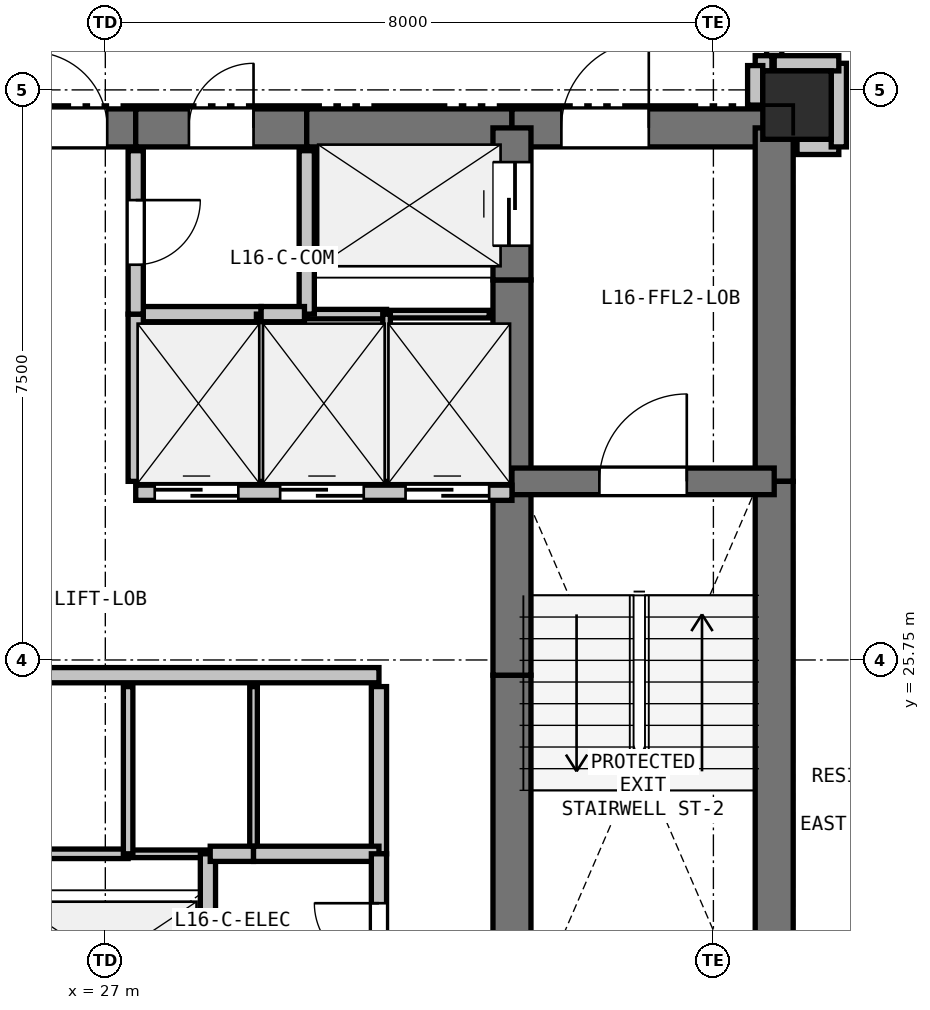
"""IFC4 building model, lengths in metres.
Left out: names, types, materials, properties, quantities, classifications, styles, units other than length and angle.
Written with IfcOpenShell. Run it as: python <this file> out.ifc"""

import sys

from ifc_helpers import new_model, si_unit, direction, frame, frame_2d, origin, origin_2d, place, context, subcontext, project, spatial, rectangle, extrude, element, fill, save


model = new_model("IFC4")
c1 = context("Model", 3, precision=1e-05, world=origin(), true_north=direction((0.0, 1.0)))
c2 = subcontext(c1, "Body", "Model", "MODEL_VIEW")
j1 = project(units=[si_unit("LENGTHUNIT", "METRE"), si_unit("PLANEANGLEUNIT", "RADIAN")], contexts=[c1])
p1 = place(None, origin())
s1 = spatial("IfcSite", under=j1, at=p1, CompositionType="ELEMENT")
p2 = place(p1, origin())
s2 = spatial("IfcBuilding", under=s1, at=p2, CompositionType="ELEMENT")
p3 = place(p2, frame((0.0, 0.0, 58.8)))
s3 = spatial("IfcBuildingStorey", under=s2, at=p3, CompositionType="ELEMENT", Elevation=58.8)
p4 = place(p3, frame((36.1, 33.05, 0.0), z_axis=(0.0, 0.0, 1.0), x_axis=(1.0, 0.0, 0.0)))
e1 = element("IfcColumn", 1, at=p4, inside=s3, PredefinedType="COLUMN", context=c2, shape_type="SweptSolid", body=[
    extrude(rectangle(XDim=0.9, YDim=0.9, at=origin_2d()), origin(), (0.0, 0.0, 1.0), 3.3),
])
p5 = place(p3, frame((25.65, 32.75, 0.0), z_axis=(0.0, 0.0, 1.0), x_axis=(1.0, 0.0, 0.0)))
e2 = element("IfcWall", 2, at=p5, inside=s3, PredefinedType="SHEAR", context=c2, shape_type="SweptSolid", body=[
    extrude(rectangle(XDim=1.75, YDim=0.5, at=frame_2d((0.875, 0.0))), origin(), (0.0, 0.0, 1.0), 3.02),
])
p6 = place(p5, frame((0.375, 0.0, 0.0)))
e3 = element("IfcOpeningElement", 3, at=p6, cuts=e2, PredefinedType="OPENING", context=c2, shape_type="SweptSolid", body=[
    extrude(rectangle(XDim=1.0, YDim=2.15, at=frame_2d((0.5, 1.075))), frame((0.0, 0.26, 0.0), z_axis=(0.0, -1.0, 0.0), x_axis=(1.0, 0.0, 0.0)), (0.0, 0.0, 1.0), 0.52),
])
p7 = place(p3, frame((27.4, 32.75, 0.0), z_axis=(0.0, 0.0, 1.0), x_axis=(1.0, 0.0, 0.0)))
e4 = element("IfcWall", 4, at=p7, inside=s3, PredefinedType="SHEAR", context=c2, shape_type="SweptSolid", body=[
    extrude(rectangle(XDim=2.25, YDim=0.5, at=frame_2d((1.125, 0.0))), origin(), (0.0, 0.0, 1.0), 3.02),
])
p8 = place(p7, frame((0.7, 0.0, 0.0)))
e5 = element("IfcOpeningElement", 5, at=p8, cuts=e4, PredefinedType="OPENING", context=c2, shape_type="SweptSolid", body=[
    extrude(rectangle(XDim=0.85, YDim=2.1, at=frame_2d((0.425, 1.05))), frame((0.0, 0.26, 0.0), z_axis=(0.0, -1.0, 0.0), x_axis=(1.0, 0.0, 0.0)), (0.0, 0.0, 1.0), 0.52),
])
p9 = place(p3, frame((29.65, 32.75, 0.0), z_axis=(0.0, 0.0, 1.0), x_axis=(1.0, 0.0, 0.0)))
e6 = element("IfcWall", 6, at=p9, inside=s3, PredefinedType="SHEAR", context=c2, shape_type="SweptSolid", body=[
    extrude(rectangle(XDim=2.7, YDim=0.5, at=frame_2d((1.35, 0.0))), origin(), (0.0, 0.0, 1.0), 3.02),
])
p10 = place(p3, frame((32.35, 32.75, 0.0), z_axis=(0.0, 0.0, 1.0), x_axis=(1.0, 0.0, 0.0)))
e7 = element("IfcWall", 7, at=p10, inside=s3, PredefinedType="SHEAR", context=c2, shape_type="SweptSolid", body=[
    extrude(rectangle(XDim=3.45, YDim=0.5, at=frame_2d((1.725, 0.0))), origin(), (0.0, 0.0, 1.0), 3.02),
])
p11 = place(p10, frame((0.65, 0.0, 0.0)))
e8 = element("IfcOpeningElement", 8, at=p11, cuts=e7, PredefinedType="OPENING", context=c2, shape_type="SweptSolid", body=[
    extrude(rectangle(XDim=1.15, YDim=2.15, at=frame_2d((0.575, 1.075))), frame((0.0, 0.26, 0.0), z_axis=(0.0, -1.0, 0.0), x_axis=(1.0, 0.0, 0.0)), (0.0, 0.0, 1.0), 0.52),
])
p12 = place(p3, frame((35.8, 32.75, 0.0), z_axis=(0.0, 0.0, 1.0), x_axis=(0.0, -1.0, 0.0)))
e9 = element("IfcWall", 9, at=p12, inside=s3, PredefinedType="SHEAR", context=c2, shape_type="SweptSolid", body=[
    extrude(rectangle(XDim=4.65, YDim=0.5, at=frame_2d((2.325, 0.0))), origin(), (0.0, 0.0, 1.0), 3.02),
])
p13 = place(p3, frame((35.8, 28.1, 0.0), z_axis=(0.0, 0.0, 1.0), x_axis=(0.0, -1.0, 0.0)))
e10 = element("IfcWall", 10, at=p13, inside=s3, PredefinedType="SHEAR", context=c2, shape_type="SweptSolid", body=[
    extrude(rectangle(XDim=7.35, YDim=0.5, at=frame_2d((3.675, 0.0))), origin(), (0.0, 0.0, 1.0), 3.02),
])
p14 = place(p3, frame((32.35, 20.75, 0.0), z_axis=(0.0, 0.0, 1.0), x_axis=(0.0, 1.0, 0.0)))
e11 = element("IfcWall", 11, at=p14, inside=s3, PredefinedType="SHEAR", context=c2, shape_type="SweptSolid", body=[
    extrude(rectangle(XDim=4.8, YDim=0.5, at=frame_2d((2.4, 0.0))), origin(), (0.0, 0.0, 1.0), 3.02),
])
p15 = place(p3, frame((32.35, 25.55, 0.0), z_axis=(0.0, 0.0, 1.0), x_axis=(0.0, 1.0, 0.0)))
e12 = element("IfcWall", 12, at=p15, inside=s3, PredefinedType="SHEAR", context=c2, shape_type="SweptSolid", body=[
    extrude(rectangle(XDim=2.4, YDim=0.5, at=frame_2d((1.2, 0.0))), origin(), (0.0, 0.0, 1.0), 3.02),
])
p16 = place(p3, frame((32.35, 27.95, 0.0), z_axis=(0.0, 0.0, 1.0), x_axis=(0.0, 1.0, 0.0)))
e13 = element("IfcWall", 13, at=p16, inside=s3, PredefinedType="SHEAR", context=c2, shape_type="SweptSolid", body=[
    extrude(rectangle(XDim=2.8, YDim=0.5, at=frame_2d((1.4, 0.0))), origin(), (0.0, 0.0, 1.0), 3.02),
])
p17 = place(p3, frame((32.35, 30.75, 0.0), z_axis=(0.0, 0.0, 1.0), x_axis=(0.0, 1.0, 0.0)))
e14 = element("IfcWall", 14, at=p17, inside=s3, PredefinedType="SHEAR", context=c2, shape_type="SweptSolid", body=[
    extrude(rectangle(XDim=2.0, YDim=0.5, at=frame_2d((1.0, 0.0))), origin(), (0.0, 0.0, 1.0), 3.02),
])
p18 = place(p17, frame((0.45, 0.0, 0.0)))
e15 = element("IfcOpeningElement", 15, at=p18, cuts=e14, PredefinedType="OPENING", context=c2, shape_type="SweptSolid", body=[
    extrude(rectangle(XDim=1.1, YDim=2.15, at=frame_2d((0.55, 1.075))), frame((0.0, 0.26, 0.0), z_axis=(0.0, -1.0, 0.0), x_axis=(1.0, 0.0, 0.0)), (0.0, 0.0, 1.0), 0.52),
])
p19 = place(p3, frame((32.35, 28.1, 0.0), z_axis=(0.0, 0.0, 1.0), x_axis=(1.0, 0.0, 0.0)))
e16 = element("IfcWall", 16, at=p19, inside=s3, PredefinedType="SHEAR", context=c2, shape_type="SweptSolid", body=[
    extrude(rectangle(XDim=3.45, YDim=0.35, at=frame_2d((1.725, 0.0))), origin(), (0.0, 0.0, 1.0), 3.02),
])
p20 = place(p19, frame((1.15, 0.0, 0.0)))
e17 = element("IfcOpeningElement", 17, at=p20, cuts=e16, PredefinedType="OPENING", context=c2, shape_type="SweptSolid", body=[
    extrude(rectangle(XDim=1.15, YDim=2.15, at=frame_2d((0.575, 1.075))), frame((0.0, 0.185, 0.0), z_axis=(0.0, -1.0, 0.0), x_axis=(1.0, 0.0, 0.0)), (0.0, 0.0, 1.0), 0.37),
])
p21 = place(p3, frame((25.65, 25.55, 0.0), z_axis=(0.0, 0.0, 1.0), x_axis=(1.0, 0.0, 0.0)))
e18 = element("IfcWall", 18, at=p21, inside=s3, PredefinedType="PARTITIONING", context=c2, shape_type="SweptSolid", body=[
    extrude(rectangle(XDim=4.95, YDim=0.2, at=frame_2d((2.475, 0.0))), origin(), (0.0, 0.0, 1.0), 3.02),
])
p22 = place(p3, frame((27.4, 27.95, 0.0), z_axis=(0.0, 0.0, 1.0), x_axis=(1.0, 0.0, 0.0)))
e19 = element("IfcWall", 19, at=p22, inside=s3, PredefinedType="PARTITIONING", context=c2, shape_type="SweptSolid", body=[
    extrude(rectangle(XDim=4.95, YDim=0.2, at=frame_2d((2.475, 0.0))), origin(), (0.0, 0.0, 1.0), 3.02),
])
p23 = place(p22, frame((0.25, 0.0, 0.0)))
e20 = element("IfcOpeningElement", 20, at=p23, cuts=e19, PredefinedType="OPENING", context=c2, shape_type="SweptSolid", body=[
    extrude(rectangle(XDim=1.1, YDim=2.15, at=frame_2d((0.55, 1.075))), frame((0.0, 0.11, 0.0), z_axis=(0.0, -1.0, 0.0), x_axis=(1.0, 0.0, 0.0)), (0.0, 0.0, 1.0), 0.22),
])
p24 = place(p22, frame((1.9, 0.0, 0.0)))
e21 = element("IfcOpeningElement", 21, at=p24, cuts=e19, PredefinedType="OPENING", context=c2, shape_type="SweptSolid", body=[
    extrude(rectangle(XDim=1.1, YDim=2.15, at=frame_2d((0.55, 1.075))), frame((0.0, 0.11, 0.0), z_axis=(0.0, -1.0, 0.0), x_axis=(1.0, 0.0, 0.0)), (0.0, 0.0, 1.0), 0.22),
])
p25 = place(p22, frame((3.55, 0.0, 0.0)))
e22 = element("IfcOpeningElement", 22, at=p25, cuts=e19, PredefinedType="OPENING", context=c2, shape_type="SweptSolid", body=[
    extrude(rectangle(XDim=1.1, YDim=2.15, at=frame_2d((0.55, 1.075))), frame((0.0, 0.11, 0.0), z_axis=(0.0, -1.0, 0.0), x_axis=(1.0, 0.0, 0.0)), (0.0, 0.0, 1.0), 0.22),
])
p26 = place(p3, frame((25.95, 23.2, 0.0), z_axis=(0.0, 0.0, 1.0), x_axis=(1.0, 0.0, 0.0)))
e23 = element("IfcWall", 23, at=p26, inside=s3, PredefinedType="PARTITIONING", context=c2, shape_type="SweptSolid", body=[
    extrude(rectangle(XDim=1.35, YDim=0.125, at=frame_2d((0.675, 0.0))), origin(), (0.0, 0.0, 1.0), 3.02),
])
p27 = place(p3, frame((27.3, 23.2, 0.0), z_axis=(0.0, 0.0, 1.0), x_axis=(1.0, 0.0, 0.0)))
e24 = element("IfcWall", 24, at=p27, inside=s3, PredefinedType="PARTITIONING", context=c2, shape_type="SweptSolid", body=[
    extrude(rectangle(XDim=1.05, YDim=0.1, at=frame_2d((0.525, 0.0))), origin(), (0.0, 0.0, 1.0), 3.02),
])
p28 = place(p3, frame((28.35, 23.2, 0.0), z_axis=(0.0, 0.0, 1.0), x_axis=(0.0, -1.0, 0.0)))
e25 = element("IfcWall", 25, at=p28, inside=s3, PredefinedType="PARTITIONING", context=c2, shape_type="SweptSolid", body=[
    extrude(rectangle(XDim=2.15, YDim=0.2, at=frame_2d((1.075, 0.0))), origin(), (0.0, 0.0, 1.0), 3.02),
])
p29 = place(p3, frame((32.05, 30.3, 0.0), z_axis=(0.0, 0.0, 1.0), x_axis=(-1.0, 0.0, 0.0)))
e26 = element("IfcWall", 26, at=p29, inside=s3, PredefinedType="PARTITIONING", context=c2, shape_type="SweptSolid", body=[
    extrude(rectangle(XDim=1.35, YDim=0.1, at=frame_2d((0.675, 0.0))), origin(), (0.0, 0.0, 1.0), 3.02),
])
p30 = place(p3, frame((30.7, 30.3, 0.0), z_axis=(0.0, 0.0, 1.0), x_axis=(-1.0, 0.0, 0.0)))
e27 = element("IfcWall", 27, at=p30, inside=s3, PredefinedType="PARTITIONING", context=c2, shape_type="SweptSolid", body=[
    extrude(rectangle(XDim=1.05, YDim=0.125, at=frame_2d((0.525, 0.0))), origin(), (0.0, 0.0, 1.0), 3.02),
])
p31 = place(p3, frame((29.65, 30.3, 0.0), z_axis=(0.0, 0.0, 1.0), x_axis=(0.0, 1.0, 0.0)))
e28 = element("IfcWall", 28, at=p31, inside=s3, PredefinedType="PARTITIONING", context=c2, shape_type="SweptSolid", body=[
    extrude(rectangle(XDim=2.15, YDim=0.2, at=frame_2d((1.075, 0.0))), origin(), (0.0, 0.0, 1.0), 3.02),
])
p32 = place(p3, frame((27.3, 25.4, 0.0), z_axis=(0.0, 0.0, 1.0), x_axis=(0.0, -1.0, 0.0)))
e29 = element("IfcWall", 29, at=p32, inside=s3, PredefinedType="PARTITIONING", context=c2, shape_type="SweptSolid", body=[
    extrude(rectangle(XDim=2.2, YDim=0.125, at=frame_2d((1.1, 0.0))), origin(), (0.0, 0.0, 1.0), 3.02),
])
p33 = place(p3, frame((28.95, 25.4, 0.0), z_axis=(0.0, 0.0, 1.0), x_axis=(0.0, -1.0, 0.0)))
e30 = element("IfcWall", 30, at=p33, inside=s3, PredefinedType="PARTITIONING", context=c2, shape_type="SweptSolid", body=[
    extrude(rectangle(XDim=2.2, YDim=0.1, at=frame_2d((1.1, 0.0))), origin(), (0.0, 0.0, 1.0), 3.02),
])
p34 = place(p3, frame((28.95, 23.2, 0.0), z_axis=(0.0, 0.0, 1.0), x_axis=(-1.0, 0.0, 0.0)))
e31 = element("IfcWall", 31, at=p34, inside=s3, PredefinedType="PARTITIONING", context=c2, shape_type="SweptSolid", body=[
    extrude(rectangle(XDim=0.57, YDim=0.2, at=frame_2d((0.285, 0.0))), origin(), (0.0, 0.0, 1.0), 3.02),
])
p35 = place(p3, frame((30.6, 25.4, 0.0), z_axis=(0.0, 0.0, 1.0), x_axis=(0.0, -1.0, 0.0)))
e32 = element("IfcWall", 32, at=p35, inside=s3, PredefinedType="PARTITIONING", context=c2, shape_type="SweptSolid", body=[
    extrude(rectangle(XDim=2.2, YDim=0.2, at=frame_2d((1.1, 0.0))), origin(), (0.0, 0.0, 1.0), 3.02),
])
for number, where, z_axis, x_axis in (
    (33, (30.6, 23.2, 0.0), (0.0, 0.0, 1.0), (-1.0, 0.0, 0.0)),
    (34, (27.4, 30.3, 0.0), (0.0, 0.0, 1.0), (1.0, 0.0, 0.0)),
):
    element("IfcWall", number, at=place(p3, frame(where, z_axis=z_axis, x_axis=x_axis)), inside=s3, PredefinedType="PARTITIONING", context=c2, shape_type="SweptSolid", body=[
        extrude(rectangle(XDim=1.65, YDim=0.2, at=frame_2d((0.825, 0.0))), origin(), (0.0, 0.0, 1.0), 3.02),
    ])
p36 = place(p3, frame((29.05, 30.3, 0.0), z_axis=(0.0, 0.0, 1.0), x_axis=(0.0, -1.0, 0.0)))
e35 = element("IfcWall", 35, at=p36, inside=s3, PredefinedType="PARTITIONING", context=c2, shape_type="SweptSolid", body=[
    extrude(rectangle(XDim=2.2, YDim=0.125, at=frame_2d((1.1, 0.0))), origin(), (0.0, 0.0, 1.0), 3.02),
])
p37 = place(p3, frame((27.4, 28.1, 0.0), z_axis=(0.0, 0.0, 1.0), x_axis=(0.0, 1.0, 0.0)))
e36 = element("IfcWall", 36, at=p37, inside=s3, PredefinedType="PARTITIONING", context=c2, shape_type="SweptSolid", body=[
    extrude(rectangle(XDim=2.2, YDim=0.2, at=frame_2d((1.1, 0.0))), origin(), (0.0, 0.0, 1.0), 3.02),
])
p38 = place(p3, frame((29.05, 30.3, 0.0), z_axis=(0.0, 0.0, 1.0), x_axis=(1.0, 0.0, 0.0)))
e37 = element("IfcWall", 37, at=p38, inside=s3, PredefinedType="PARTITIONING", context=c2, shape_type="SweptSolid", body=[
    extrude(rectangle(XDim=0.57, YDim=0.2, at=frame_2d((0.285, 0.0))), origin(), (0.0, 0.0, 1.0), 3.02),
])
p39 = place(p3, frame((30.7, 30.3, 0.0), z_axis=(0.0, 0.0, 1.0), x_axis=(0.0, -1.0, 0.0)))
e38 = element("IfcWall", 38, at=p39, inside=s3, PredefinedType="PARTITIONING", context=c2, shape_type="SweptSolid", body=[
    extrude(rectangle(XDim=2.2, YDim=0.1, at=frame_2d((1.1, 0.0))), origin(), (0.0, 0.0, 1.0), 3.02),
])
p40 = place(p3, frame((30.6, 21.05, 0.0), z_axis=(0.0, 0.0, 1.0), x_axis=(0.0, 1.0, 0.0)))
e39 = element("IfcWall", 39, at=p40, inside=s3, PredefinedType="PARTITIONING", context=c2, shape_type="SweptSolid", body=[
    extrude(rectangle(XDim=2.15, YDim=0.2, at=frame_2d((1.075, 0.0))), origin(), (0.0, 0.0, 1.0), 3.02),
])
p41 = place(p40, frame((0.65, 0.0, 0.0)))
e40 = element("IfcOpeningElement", 40, at=p41, cuts=e39, PredefinedType="OPENING", context=c2, shape_type="SweptSolid", body=[
    extrude(rectangle(XDim=0.85, YDim=2.1, at=frame_2d((0.425, 1.05))), frame((0.0, 0.11, 0.0), z_axis=(0.0, -1.0, 0.0), x_axis=(1.0, 0.0, 0.0)), (0.0, 0.0, 1.0), 0.22),
])
p42 = place(p3, frame((27.4, 32.45, 0.0), z_axis=(0.0, 0.0, 1.0), x_axis=(0.0, -1.0, 0.0)))
e41 = element("IfcWall", 41, at=p42, inside=s3, PredefinedType="PARTITIONING", context=c2, shape_type="SweptSolid", body=[
    extrude(rectangle(XDim=2.15, YDim=0.2, at=frame_2d((1.075, 0.0))), origin(), (0.0, 0.0, 1.0), 3.02),
])
p43 = place(p42, frame((0.65, 0.0, 0.0)))
e42 = element("IfcOpeningElement", 42, at=p43, cuts=e41, PredefinedType="OPENING", context=c2, shape_type="SweptSolid", body=[
    extrude(rectangle(XDim=0.85, YDim=2.1, at=frame_2d((0.425, 1.05))), frame((0.0, 0.11, 0.0), z_axis=(0.0, -1.0, 0.0), x_axis=(1.0, 0.0, 0.0)), (0.0, 0.0, 1.0), 0.22),
])
p44 = place(p3, frame((35.8, 35.35, 0.0), z_axis=(0.0, 0.0, 1.0), x_axis=(0.0, -1.0, 0.0)))
e43 = element("IfcWall", 43, at=p44, inside=s3, PredefinedType="PARTITIONING", context=c2, shape_type="SweptSolid", body=[
    extrude(rectangle(XDim=1.75, YDim=0.2, at=frame_2d((0.875, 0.0))), origin(), (0.0, 0.0, 1.0), 3.02),
])
p45 = place(p44, frame((0.375, 0.0, 0.0)))
e44 = element("IfcOpeningElement", 44, at=p45, cuts=e43, PredefinedType="OPENING", context=c2, shape_type="SweptSolid", body=[
    extrude(rectangle(XDim=1.0, YDim=2.15, at=frame_2d((0.5, 1.075))), frame((0.0, 0.11, 0.0), z_axis=(0.0, -1.0, 0.0), x_axis=(1.0, 0.0, 0.0)), (0.0, 0.0, 1.0), 0.22),
])
p46 = place(p3, frame((35.77, 33.6, 0.0), z_axis=(0.0, 0.0, 1.0), x_axis=(-1.0, 0.0, 0.0)))
e45 = element("IfcWall", 45, at=p46, inside=s3, PredefinedType="PARTITIONING", context=c2, shape_type="SweptSolid", body=[
    extrude(rectangle(XDim=0.22, YDim=0.2, at=frame_2d((0.11, 0.0))), origin(), (0.0, 0.0, 1.0), 3.02),
])
p47 = place(p3, frame((35.55, 33.57, 0.0), z_axis=(0.0, 0.0, 1.0), x_axis=(0.0, -1.0, 0.0)))
e46 = element("IfcWall", 46, at=p47, inside=s3, PredefinedType="PARTITIONING", context=c2, shape_type="SweptSolid", body=[
    extrude(rectangle(XDim=0.52, YDim=0.2, at=frame_2d((0.26, 0.0))), origin(), (0.0, 0.0, 1.0), 2.468),
])
p48 = place(p3, frame((36.1, 32.5, 0.0), z_axis=(0.0, 0.0, 1.0), x_axis=(1.0, 0.0, 0.0)))
e47 = element("IfcWall", 47, at=p48, inside=s3, PredefinedType="PARTITIONING", context=c2, shape_type="SweptSolid", body=[
    extrude(rectangle(XDim=0.55, YDim=0.2, at=frame_2d((0.275, 0.0))), origin(), (0.0, 0.0, 1.0), 2.468),
])
p49 = place(p3, frame((36.65, 32.5, 0.0), z_axis=(0.0, 0.0, 1.0), x_axis=(0.0, 1.0, 0.0)))
e48 = element("IfcWall", 48, at=p49, inside=s3, PredefinedType="PARTITIONING", context=c2, shape_type="SweptSolid", body=[
    extrude(rectangle(XDim=1.1, YDim=0.2, at=frame_2d((0.55, 0.0))), origin(), (0.0, 0.0, 1.0), 2.317),
])
p50 = place(p3, frame((36.65, 33.6, 0.0), z_axis=(0.0, 0.0, 1.0), x_axis=(-1.0, 0.0, 0.0)))
e49 = element("IfcWall", 49, at=p50, inside=s3, PredefinedType="PARTITIONING", context=c2, shape_type="SweptSolid", body=[
    extrude(rectangle(XDim=0.85, YDim=0.2, at=frame_2d((0.425, 0.0))), origin(), (0.0, 0.0, 1.0), 2.317),
])
p51 = place(p23, origin())
e50 = element("IfcDoor", 50, at=p51, inside=s3, OperationType="SLIDING_TO_LEFT", PredefinedType="DOOR", context=c2, shape_type="SweptSolid", body=[
    extrude(rectangle(XDim=1.1, YDim=2.15, at=frame_2d((0.55, 1.075))), frame((0.0, 0.025, 0.0), z_axis=(0.0, -1.0, 0.0), x_axis=(1.0, 0.0, 0.0)), (0.0, 0.0, 1.0), 0.05),
])
fill(e20, e50)
p52 = place(p24, origin())
e51 = element("IfcDoor", 51, at=p52, inside=s3, OperationType="SLIDING_TO_LEFT", PredefinedType="DOOR", context=c2, shape_type="SweptSolid", body=[
    extrude(rectangle(XDim=1.1, YDim=2.15, at=frame_2d((0.55, 1.075))), frame((0.0, 0.025, 0.0), z_axis=(0.0, -1.0, 0.0), x_axis=(1.0, 0.0, 0.0)), (0.0, 0.0, 1.0), 0.05),
])
fill(e21, e51)
p53 = place(p25, origin())
e52 = element("IfcDoor", 52, at=p53, inside=s3, OperationType="SLIDING_TO_LEFT", PredefinedType="DOOR", context=c2, shape_type="SweptSolid", body=[
    extrude(rectangle(XDim=1.1, YDim=2.15, at=frame_2d((0.55, 1.075))), frame((0.0, 0.025, 0.0), z_axis=(0.0, -1.0, 0.0), x_axis=(1.0, 0.0, 0.0)), (0.0, 0.0, 1.0), 0.05),
])
fill(e22, e52)
p54 = place(p6, origin())
e53 = element("IfcDoor", 53, at=p54, inside=s3, OperationType="SINGLE_SWING_LEFT", PredefinedType="DOOR", context=c2, shape_type="SweptSolid", body=[
    extrude(rectangle(XDim=1.0, YDim=2.15, at=frame_2d((0.5, 1.075))), frame((0.0, 0.025, 0.0), z_axis=(0.0, -1.0, 0.0), x_axis=(1.0, 0.0, 0.0)), (0.0, 0.0, 1.0), 0.05),
])
fill(e3, e53)
p55 = place(p18, origin())
e54 = element("IfcDoor", 54, at=p55, inside=s3, OperationType="SLIDING_TO_LEFT", PredefinedType="DOOR", context=c2, shape_type="SweptSolid", body=[
    extrude(rectangle(XDim=1.1, YDim=2.15, at=frame_2d((0.55, 1.075))), frame((0.0, 0.025, 0.0), z_axis=(0.0, -1.0, 0.0), x_axis=(1.0, 0.0, 0.0)), (0.0, 0.0, 1.0), 0.05),
])
fill(e15, e54)
p56 = place(p20, origin())
e55 = element("IfcDoor", 55, at=p56, inside=s3, OperationType="SINGLE_SWING_RIGHT", PredefinedType="DOOR", context=c2, shape_type="SweptSolid", body=[
    extrude(rectangle(XDim=1.15, YDim=2.15, at=frame_2d((0.575, 1.075))), frame((0.0, 0.025, 0.0), z_axis=(0.0, -1.0, 0.0), x_axis=(1.0, 0.0, 0.0)), (0.0, 0.0, 1.0), 0.05),
])
fill(e17, e55)
p57 = place(p11, origin())
e56 = element("IfcDoor", 56, at=p57, inside=s3, OperationType="SINGLE_SWING_RIGHT", PredefinedType="DOOR", context=c2, shape_type="SweptSolid", body=[
    extrude(rectangle(XDim=1.15, YDim=2.15, at=frame_2d((0.575, 1.075))), frame((0.0, 0.025, 0.0), z_axis=(0.0, -1.0, 0.0), x_axis=(1.0, 0.0, 0.0)), (0.0, 0.0, 1.0), 0.05),
])
fill(e8, e56)
p58 = place(p41, origin())
e57 = element("IfcDoor", 57, at=p58, inside=s3, OperationType="SINGLE_SWING_RIGHT", PredefinedType="DOOR", context=c2, shape_type="SweptSolid", body=[
    extrude(rectangle(XDim=0.85, YDim=2.1, at=frame_2d((0.425, 1.05))), frame((0.0, 0.025, 0.0), z_axis=(0.0, -1.0, 0.0), x_axis=(1.0, 0.0, 0.0)), (0.0, 0.0, 1.0), 0.05),
])
fill(e40, e57)
p59 = place(p43, origin())
e58 = element("IfcDoor", 58, at=p59, inside=s3, OperationType="SINGLE_SWING_LEFT", PredefinedType="DOOR", context=c2, shape_type="SweptSolid", body=[
    extrude(rectangle(XDim=0.85, YDim=2.1, at=frame_2d((0.425, 1.05))), frame((0.0, 0.025, 0.0), z_axis=(0.0, -1.0, 0.0), x_axis=(1.0, 0.0, 0.0)), (0.0, 0.0, 1.0), 0.05),
])
fill(e42, e58)
p60 = place(p8, origin())
e59 = element("IfcDoor", 59, at=p60, inside=s3, OperationType="SINGLE_SWING_RIGHT", PredefinedType="DOOR", context=c2, shape_type="SweptSolid", body=[
    extrude(rectangle(XDim=0.85, YDim=2.1, at=frame_2d((0.425, 1.05))), frame((0.0, 0.025, 0.0), z_axis=(0.0, -1.0, 0.0), x_axis=(1.0, 0.0, 0.0)), (0.0, 0.0, 1.0), 0.05),
])
fill(e5, e59)
save(model, sys.argv[1])
